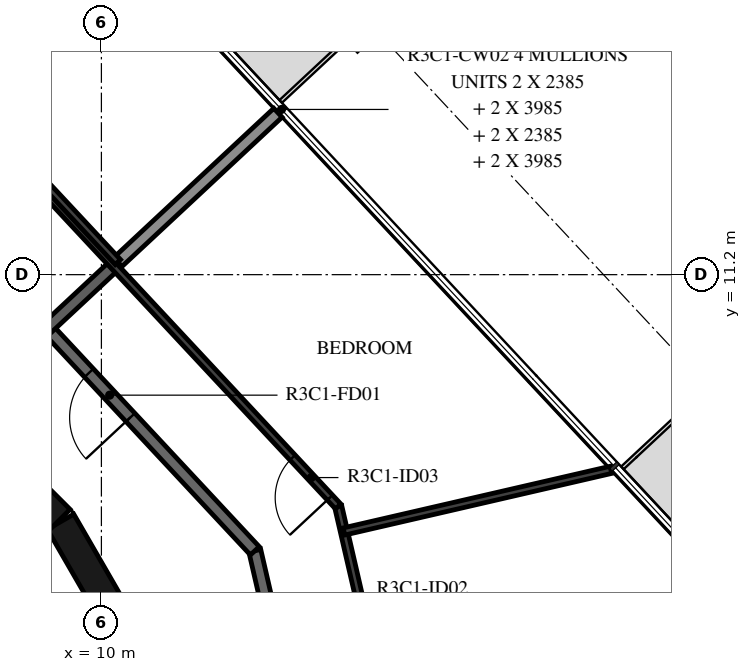
"""IFC4 building model, lengths in metres.
Left out: names, types, materials, properties, quantities, classifications, styles, units other than length and angle.
Written with IfcOpenShell. Run it as: python <this file> out.ifc"""

import sys

from ifc_helpers import new_model, si_unit, direction, frame, frame_2d, origin, place, context, subcontext, project, spatial, rectangle, extrude, element, fill, save


model = new_model("IFC4")
c1 = context("Model", 3, precision=1e-05, world=origin(), true_north=direction((0.0, 1.0)))
c2 = subcontext(c1, "Body", "Model", "MODEL_VIEW")
j1 = project(units=[si_unit("LENGTHUNIT", "METRE"), si_unit("PLANEANGLEUNIT", "RADIAN")], contexts=[c1])
p1 = place(None, origin())
s1 = spatial("IfcSite", under=j1, at=p1, CompositionType="ELEMENT")
p2 = place(p1, origin())
s2 = spatial("IfcBuilding", under=s1, at=p2, CompositionType="ELEMENT")
p3 = place(p2, frame((0.0, 0.0, 137.9)))
s3 = spatial("IfcBuildingStorey", under=s2, at=p3, CompositionType="ELEMENT", Elevation=137.9)
p4 = place(p3, frame((10.845, 4.51, 0.0), z_axis=(0.0, 0.0, 1.0), x_axis=(-0.500087131594, 0.865975092491, 0.0)))
e1 = element("IfcWall", 1, at=p4, inside=s3, PredefinedType="SHEAR", context=c2, shape_type="SweptSolid", body=[
    extrude(rectangle(XDim=3.033, YDim=0.5, at=frame_2d((1.516, 0.0))), origin(), (0.0, 0.0, 1.0), 3.12),
])
p5 = place(p3, frame((9.308, 7.164, 0.0), z_axis=(0.0, 0.0, 1.0), x_axis=(-0.707106781187, 0.707106781187, 0.0)))
e2 = element("IfcWall", 2, at=p5, inside=s3, PredefinedType="SHEAR", context=c2, shape_type="SweptSolid", body=[
    extrude(rectangle(XDim=3.032, YDim=0.5, at=frame_2d((1.516, 0.0))), origin(), (0.0, 0.0, 1.0), 3.12),
])
p6 = place(p5, frame((0.416, 0.0, 0.0)))
e3 = element("IfcOpeningElement", 3, at=p6, cuts=e2, PredefinedType="OPENING", context=c2, shape_type="SweptSolid", body=[
    extrude(rectangle(XDim=1.2, YDim=2.1, at=frame_2d((0.6, 1.05))), frame((0.0, 0.26, 0.0), z_axis=(0.0, -1.0, 0.0), x_axis=(1.0, 0.0, 0.0)), (0.0, 0.0, 1.0), 0.52),
])
p7 = place(p3, frame((14.175, -0.495, 0.0), z_axis=(0.0, 0.0, 1.0), x_axis=(-0.224922649383, 0.974376622151, 0.0)))
e4 = element("IfcWall", 4, at=p7, inside=s3, PredefinedType="STANDARD", context=c2, shape_type="SweptSolid", body=[
    extrude(rectangle(XDim=7.342, YDim=0.2, at=frame_2d((3.671, 0.0))), origin(), (0.0, 0.0, 1.0), 3.12),
])
p8 = place(p3, frame((12.523, 6.659, 0.0), z_axis=(0.0, 0.0, 1.0), x_axis=(-0.682001841105, 0.731350455479, 0.0)))
e5 = element("IfcWall", 5, at=p8, inside=s3, PredefinedType="STANDARD", context=c2, shape_type="SweptSolid", body=[
    extrude(rectangle(XDim=7.342, YDim=0.2, at=frame_2d((3.671, 0.0))), origin(), (0.0, 0.0, 1.0), 3.12),
])
p9 = place(p8, frame((3.0, 0.0, 0.0)))
e6 = element("IfcOpeningElement", 6, at=p9, cuts=e5, PredefinedType="OPENING", context=c2, shape_type="SweptSolid", body=[
    extrude(rectangle(XDim=1.0, YDim=2.1, at=frame_2d((0.5, 1.05))), frame((0.0, 0.11, 0.0), z_axis=(0.0, -1.0, 0.0), x_axis=(1.0, 0.0, 0.0)), (0.0, 0.0, 1.0), 0.22),
])
p10 = place(p8, frame((5.209, 0.0, 0.0)))
e7 = element("IfcOpeningElement", 7, at=p10, cuts=e5, PredefinedType="OPENING", context=c2, shape_type="SweptSolid", body=[
    extrude(rectangle(XDim=1.0, YDim=2.1, at=frame_2d((0.5, 1.05))), frame((0.0, 0.11, 0.0), z_axis=(0.0, -1.0, 0.0), x_axis=(1.0, 0.0, 0.0)), (0.0, 0.0, 1.0), 0.22),
])
p11 = place(p3, frame((10.233, 11.372, 0.0), z_axis=(0.0, 0.0, 1.0), x_axis=(-0.731329353292, -0.682024469513, 0.0)))
e8 = element("IfcWall", 8, at=p11, inside=s3, PredefinedType="STANDARD", context=c2, shape_type="SweptSolid", body=[
    extrude(rectangle(XDim=1.54, YDim=0.2, at=frame_2d((0.77, 0.0))), origin(), (0.0, 0.0, 1.0), 3.12),
])
p12 = place(p3, frame((12.903, 13.862, 0.0), z_axis=(0.0, 0.0, 1.0), x_axis=(-0.731328084739, -0.682025829769, 0.0)))
e9 = element("IfcWall", 9, at=p12, inside=s3, PredefinedType="STANDARD", context=c2, shape_type="SweptSolid", body=[
    extrude(rectangle(XDim=3.6, YDim=0.2, at=frame_2d((1.8, 0.0))), origin(), (0.0, 0.0, 1.0), 2.73),
])
p13 = place(p3, frame((15.727, -0.549, 0.0), z_axis=(0.0, 0.0, 1.0), x_axis=(-0.22493611855, 0.974373512864, 0.0)))
e10 = element("IfcWall", 10, at=p13, inside=s3, PredefinedType="PARTITIONING", context=c2, shape_type="SweptSolid", body=[
    extrude(rectangle(XDim=8.146, YDim=0.12, at=frame_2d((4.073, 0.0))), origin(), (0.0, 0.0, 1.0), 3.12),
])
p14 = place(p13, frame((5.327, 0.0, 0.0)))
e11 = element("IfcOpeningElement", 11, at=p14, cuts=e10, PredefinedType="OPENING", context=c2, shape_type="SweptSolid", body=[
    extrude(rectangle(XDim=0.9, YDim=2.1, at=frame_2d((0.45, 1.05))), frame((0.0, 0.07, 0.0), z_axis=(0.0, -1.0, 0.0), x_axis=(1.0, 0.0, 0.0)), (0.0, 0.0, 1.0), 0.14),
])
p15 = place(p3, frame((13.894, 7.388, 0.0), z_axis=(0.0, 0.0, 1.0), x_axis=(-0.681994622729, 0.731357186721, 0.0)))
e12 = element("IfcWall", 12, at=p15, inside=s3, PredefinedType="PARTITIONING", context=c2, shape_type="SweptSolid", body=[
    extrude(rectangle(XDim=8.146, YDim=0.12, at=frame_2d((4.073, 0.0))), origin(), (0.0, 0.0, 1.0), 3.12),
])
p16 = place(p15, frame((0.2, 0.0, 0.0)))
e13 = element("IfcOpeningElement", 13, at=p16, cuts=e12, PredefinedType="OPENING", context=c2, shape_type="SweptSolid", body=[
    extrude(rectangle(XDim=0.9, YDim=2.1, at=frame_2d((0.45, 1.05))), frame((0.0, 0.07, 0.0), z_axis=(0.0, -1.0, 0.0), x_axis=(1.0, 0.0, 0.0)), (0.0, 0.0, 1.0), 0.14),
])
p17 = place(p3, frame((18.379, 7.99, 0.0), z_axis=(0.0, 0.0, 1.0), x_axis=(-0.974372926515, -0.224938658471, 0.0)))
e14 = element("IfcWall", 14, at=p17, inside=s3, PredefinedType="PARTITIONING", context=c2, shape_type="SweptSolid", body=[
    extrude(rectangle(XDim=4.505, YDim=0.12, at=frame_2d((2.253, 0.0))), origin(), (0.0, 0.0, 1.0), 3.12),
])
p18 = place(p3, frame((-1.539, 24.071, 0.0), z_axis=(0.0, 0.0, 1.0), x_axis=(0.68200220595, -0.731350115252, 0.0)))
e15 = element("IfcWall", 15, at=p18, inside=s3, PredefinedType="PARTITIONING", context=c2, shape_type="SweptSolid", body=[
    extrude(rectangle(XDim=17.316, YDim=0.12, at=frame_2d((8.658, 0.0))), origin(), (0.0, 0.0, 1.0), 3.12),
])
p19 = place(p18, frame((3.323, 0.0, 0.0)))
e16 = element("IfcOpeningElement", 16, at=p19, cuts=e15, PredefinedType="OPENING", context=c2, shape_type="SweptSolid", body=[
    extrude(rectangle(XDim=0.9, YDim=2.1, at=frame_2d((0.45, 1.05))), frame((0.0, 0.07, 0.0), z_axis=(0.0, -1.0, 0.0), x_axis=(1.0, 0.0, 0.0)), (0.0, 0.0, 1.0), 0.14),
])
p20 = place(p18, frame((0.2, 0.0, 0.0)))
e17 = element("IfcOpeningElement", 17, at=p20, cuts=e15, PredefinedType="OPENING", context=c2, shape_type="SweptSolid", body=[
    extrude(rectangle(XDim=0.9, YDim=2.1, at=frame_2d((0.45, 1.05))), frame((0.0, 0.07, 0.0), z_axis=(0.0, -1.0, 0.0), x_axis=(1.0, 0.0, 0.0)), (0.0, 0.0, 1.0), 0.14),
])
p21 = place(p9, origin())
e18 = element("IfcDoor", 18, at=p21, inside=s3, OperationType="SINGLE_SWING_LEFT", PredefinedType="DOOR", context=c2, shape_type="SweptSolid", body=[
    extrude(rectangle(XDim=1.0, YDim=2.1, at=frame_2d((0.5, 1.05))), frame((0.0, 0.025, 0.0), z_axis=(0.0, -1.0, 0.0), x_axis=(1.0, 0.0, 0.0)), (0.0, 0.0, 1.0), 0.05),
])
fill(e6, e18)
p22 = place(p16, origin())
e19 = element("IfcDoor", 19, at=p22, inside=s3, OperationType="SINGLE_SWING_LEFT", PredefinedType="DOOR", context=c2, shape_type="SweptSolid", body=[
    extrude(rectangle(XDim=0.9, YDim=2.1, at=frame_2d((0.45, 1.05))), frame((0.0, 0.025, 0.0), z_axis=(0.0, -1.0, 0.0), x_axis=(1.0, 0.0, 0.0)), (0.0, 0.0, 1.0), 0.05),
])
fill(e13, e19)
save(model, sys.argv[1])
